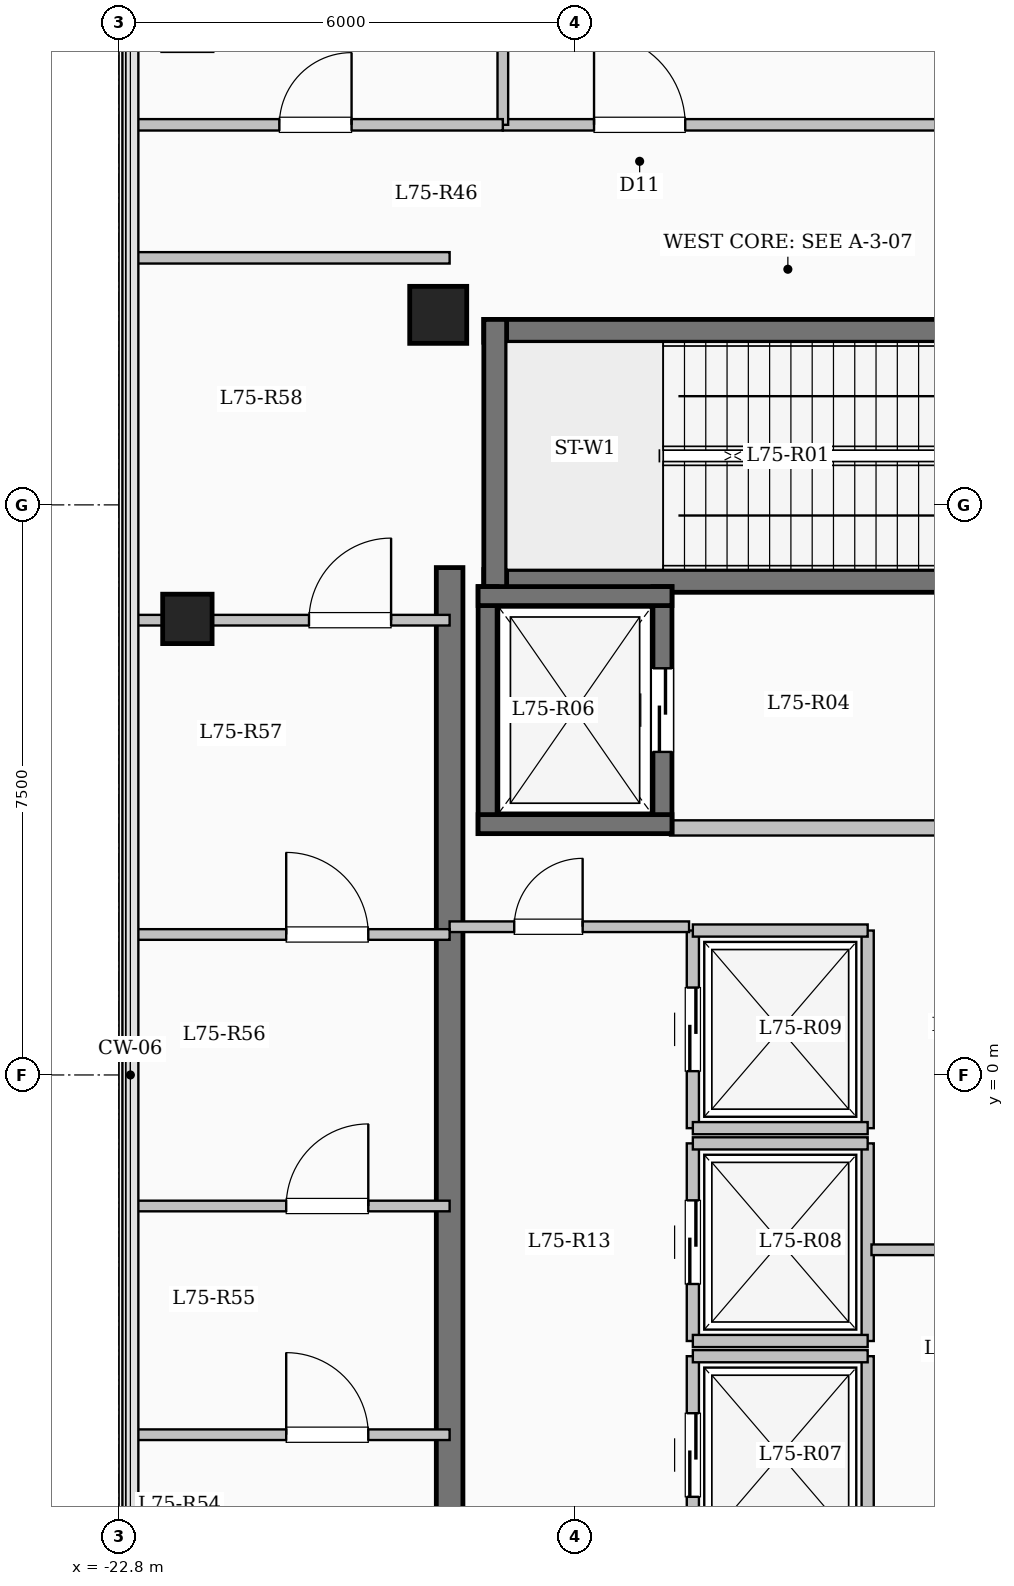
"""IFC4 building model, lengths in metres.
Left out: names, types, materials, properties, quantities, classifications, styles, units other than length and angle.
Written with IfcOpenShell. Run it as: python <this file> out.ifc"""

import sys

from ifc_helpers import new_model, si_unit, direction, frame, frame_2d, origin, origin_2d, place, context, subcontext, project, spatial, rectangle, extrude, element, fill, save


model = new_model("IFC4")
c1 = context("Model", 3, precision=1e-05, world=origin(), true_north=direction((0.0, 1.0)))
c2 = subcontext(c1, "Body", "Model", "MODEL_VIEW")
j1 = project(units=[si_unit("LENGTHUNIT", "METRE"), si_unit("PLANEANGLEUNIT", "RADIAN")], contexts=[c1])
p1 = place(None, origin())
s1 = spatial("IfcSite", under=j1, at=p1, CompositionType="ELEMENT")
p2 = place(p1, origin())
s2 = spatial("IfcBuilding", under=s1, at=p2, CompositionType="ELEMENT")
p3 = place(p2, frame((0.0, 0.0, 276.3)))
s3 = spatial("IfcBuildingStorey", under=s2, at=p3, CompositionType="ELEMENT", Elevation=276.3)
p4 = place(p3, frame((-18.6, 10.0, 0.0), z_axis=(0.0, 0.0, 1.0), x_axis=(1.0, 0.0, 0.0)))
e1 = element("IfcColumn", 1, at=p4, inside=s3, PredefinedType="COLUMN", context=c2, shape_type="SweptSolid", body=[
    extrude(rectangle(XDim=0.75, YDim=0.75, at=origin_2d()), origin(), (0.0, 0.0, 1.0), 5.25),
])
for number, where, z_axis, x_axis in (
    (2, (-21.9, -6.0, 0.0), (0.0, 0.0, 1.0), (1.0, 0.0, 0.0)),
    (3, (-21.9, 6.0, 0.0), (0.0, 0.0, 1.0), (1.0, 0.0, 0.0)),
):
    element("IfcColumn", number, at=place(p3, frame(where, z_axis=z_axis, x_axis=x_axis)), inside=s3, PredefinedType="COLUMN", context=c2, shape_type="SweptSolid", body=[
        extrude(rectangle(XDim=0.65, YDim=0.65, at=origin_2d()), origin(), (0.0, 0.0, 1.0), 5.25),
    ])
p5 = place(p3, frame((-18.0, 9.79, 0.0), z_axis=(0.0, 0.0, 1.0), x_axis=(1.0, 0.0, 0.0)))
e4 = element("IfcWall", 4, at=p5, inside=s3, PredefinedType="SHEAR", context=c2, shape_type="SweptSolid", body=[
    extrude(rectangle(XDim=8.0, YDim=0.3, at=frame_2d((4.0, 0.0))), origin(), (0.0, 0.0, 1.0), 5.25),
])
p6 = place(p3, frame((-18.0, 6.5, 0.0), z_axis=(0.0, 0.0, 1.0), x_axis=(1.0, 0.0, 0.0)))
e5 = element("IfcWall", 5, at=p6, inside=s3, PredefinedType="SHEAR", context=c2, shape_type="SweptSolid", body=[
    extrude(rectangle(XDim=8.0, YDim=0.3, at=frame_2d((4.0, 0.0))), origin(), (0.0, 0.0, 1.0), 5.25),
])
p7 = place(p6, frame((6.45, 0.0, 0.0)))
e6 = element("IfcOpeningElement", 6, at=p7, cuts=e5, PredefinedType="OPENING", context=c2, shape_type="SweptSolid", body=[
    extrude(rectangle(XDim=1.0, YDim=2.15, at=frame_2d((0.5, 1.075))), frame((0.0, 0.16, 0.0), z_axis=(0.0, -1.0, 0.0), x_axis=(1.0, 0.0, 0.0)), (0.0, 0.0, 1.0), 0.32),
])
p8 = place(p3, frame((-17.85, 6.35, 0.0), z_axis=(0.0, 0.0, 1.0), x_axis=(0.0, 1.0, 0.0)))
e7 = element("IfcWall", 7, at=p8, inside=s3, PredefinedType="SHEAR", context=c2, shape_type="SweptSolid", body=[
    extrude(rectangle(XDim=3.59, YDim=0.3, at=frame_2d((1.795, 0.0))), origin(), (0.0, 0.0, 1.0), 5.25),
])
p9 = place(p3, frame((-15.55, 3.25, 0.0), z_axis=(0.0, 0.0, 1.0), x_axis=(1.0, 0.0, 0.0)))
e8 = element("IfcWall", 8, at=p9, inside=s3, PredefinedType="SOLIDWALL", context=c2, shape_type="SweptSolid", body=[
    extrude(rectangle(XDim=5.4, YDim=0.2, at=frame_2d((2.7, 0.0))), origin(), (0.0, 0.0, 1.0), 4.95),
])
p10 = place(p3, frame((-17.95, 3.175, 0.0), z_axis=(0.0, 0.0, 1.0), x_axis=(0.0, 1.0, 0.0)))
e9 = element("IfcWall", 9, at=p10, inside=s3, PredefinedType="SHEAR", context=c2, shape_type="SweptSolid", body=[
    extrude(rectangle(XDim=3.25, YDim=0.25, at=frame_2d((1.625, 0.0))), origin(), (0.0, 0.0, 1.0), 5.25),
])
p11 = place(p3, frame((-15.65, 3.175, 0.0), z_axis=(0.0, 0.0, 1.0), x_axis=(0.0, 1.0, 0.0)))
e10 = element("IfcWall", 10, at=p11, inside=s3, PredefinedType="SHEAR", context=c2, shape_type="SweptSolid", body=[
    extrude(rectangle(XDim=3.25, YDim=0.25, at=frame_2d((1.625, 0.0))), origin(), (0.0, 0.0, 1.0), 5.25),
])
p12 = place(p11, frame((1.075, 0.0, 0.0)))
e11 = element("IfcOpeningElement", 11, at=p12, cuts=e10, PredefinedType="OPENING", context=c2, shape_type="SweptSolid", body=[
    extrude(rectangle(XDim=1.1, YDim=2.15, at=frame_2d((0.55, 1.075))), frame((0.0, 0.135, 0.0), z_axis=(0.0, -1.0, 0.0), x_axis=(1.0, 0.0, 0.0)), (0.0, 0.0, 1.0), 0.27),
])
for number, where, z_axis, x_axis in (
    (12, (-18.075, 3.3, 0.0), (0.0, 0.0, 1.0), (1.0, 0.0, 0.0)),
    (13, (-18.075, 6.3, 0.0), (0.0, 0.0, 1.0), (1.0, 0.0, 0.0)),
):
    element("IfcWall", number, at=place(p3, frame(where, z_axis=z_axis, x_axis=x_axis)), inside=s3, PredefinedType="SHEAR", context=c2, shape_type="SweptSolid", body=[
        extrude(rectangle(XDim=2.55, YDim=0.25, at=frame_2d((1.275, 0.0))), origin(), (0.0, 0.0, 1.0), 5.25),
    ])
p13 = place(p3, frame((-15.25, -6.3, 0.0), z_axis=(0.0, 0.0, 1.0), x_axis=(0.0, 1.0, 0.0)))
e14 = element("IfcWall", 14, at=p13, inside=s3, PredefinedType="SOLIDWALL", context=c2, shape_type="SweptSolid", body=[
    extrude(rectangle(XDim=2.6, YDim=0.16, at=frame_2d((1.3, 0.0))), origin(), (0.0, 0.0, 1.0), 4.95),
])
p14 = place(p13, frame((0.75, 0.0, 0.0)))
e15 = element("IfcOpeningElement", 15, at=p14, cuts=e14, PredefinedType="OPENING", context=c2, shape_type="SweptSolid", body=[
    extrude(rectangle(XDim=1.1, YDim=2.15, at=frame_2d((0.55, 1.075))), frame((0.0, 0.09, 0.0), z_axis=(0.0, -1.0, 0.0), x_axis=(1.0, 0.0, 0.0)), (0.0, 0.0, 1.0), 0.18),
])
p15 = place(p3, frame((-12.95, -6.3, 0.0), z_axis=(0.0, 0.0, 1.0), x_axis=(0.0, 1.0, 0.0)))
e16 = element("IfcWall", 16, at=p15, inside=s3, PredefinedType="SOLIDWALL", context=c2, shape_type="SweptSolid", body=[
    extrude(rectangle(XDim=2.6, YDim=0.16, at=frame_2d((1.3, 0.0))), origin(), (0.0, 0.0, 1.0), 4.95),
])
p16 = place(p3, frame((-15.25, -3.7, 0.0), z_axis=(0.0, 0.0, 1.0), x_axis=(1.0, 0.0, 0.0)))
e17 = element("IfcWall", 17, at=p16, inside=s3, PredefinedType="SOLIDWALL", context=c2, shape_type="SweptSolid", body=[
    extrude(rectangle(XDim=2.3, YDim=0.16, at=frame_2d((1.15, 0.0))), origin(), (0.0, 0.0, 1.0), 4.95),
])
p17 = place(p3, frame((-15.25, -3.5, 0.0), z_axis=(0.0, 0.0, 1.0), x_axis=(0.0, 1.0, 0.0)))
e18 = element("IfcWall", 18, at=p17, inside=s3, PredefinedType="SOLIDWALL", context=c2, shape_type="SweptSolid", body=[
    extrude(rectangle(XDim=2.6, YDim=0.16, at=frame_2d((1.3, 0.0))), origin(), (0.0, 0.0, 1.0), 4.95),
])
p18 = place(p17, frame((0.75, 0.0, 0.0)))
e19 = element("IfcOpeningElement", 19, at=p18, cuts=e18, PredefinedType="OPENING", context=c2, shape_type="SweptSolid", body=[
    extrude(rectangle(XDim=1.1, YDim=2.15, at=frame_2d((0.55, 1.075))), frame((0.0, 0.09, 0.0), z_axis=(0.0, -1.0, 0.0), x_axis=(1.0, 0.0, 0.0)), (0.0, 0.0, 1.0), 0.18),
])
p19 = place(p3, frame((-12.95, -3.5, 0.0), z_axis=(0.0, 0.0, 1.0), x_axis=(0.0, 1.0, 0.0)))
e20 = element("IfcWall", 20, at=p19, inside=s3, PredefinedType="SOLIDWALL", context=c2, shape_type="SweptSolid", body=[
    extrude(rectangle(XDim=2.6, YDim=0.16, at=frame_2d((1.3, 0.0))), origin(), (0.0, 0.0, 1.0), 4.95),
])
for number, where, z_axis, x_axis in (
    (21, (-15.25, -3.5, 0.0), (0.0, 0.0, 1.0), (1.0, 0.0, 0.0)),
    (22, (-15.25, -0.9, 0.0), (0.0, 0.0, 1.0), (1.0, 0.0, 0.0)),
):
    element("IfcWall", number, at=place(p3, frame(where, z_axis=z_axis, x_axis=x_axis)), inside=s3, PredefinedType="SOLIDWALL", context=c2, shape_type="SweptSolid", body=[
        extrude(rectangle(XDim=2.3, YDim=0.16, at=frame_2d((1.15, 0.0))), origin(), (0.0, 0.0, 1.0), 4.95),
    ])
p20 = place(p3, frame((-15.25, -0.7, 0.0), z_axis=(0.0, 0.0, 1.0), x_axis=(0.0, 1.0, 0.0)))
e23 = element("IfcWall", 23, at=p20, inside=s3, PredefinedType="SOLIDWALL", context=c2, shape_type="SweptSolid", body=[
    extrude(rectangle(XDim=2.6, YDim=0.16, at=frame_2d((1.3, 0.0))), origin(), (0.0, 0.0, 1.0), 4.95),
])
p21 = place(p20, frame((0.75, 0.0, 0.0)))
e24 = element("IfcOpeningElement", 24, at=p21, cuts=e23, PredefinedType="OPENING", context=c2, shape_type="SweptSolid", body=[
    extrude(rectangle(XDim=1.1, YDim=2.15, at=frame_2d((0.55, 1.075))), frame((0.0, 0.09, 0.0), z_axis=(0.0, -1.0, 0.0), x_axis=(1.0, 0.0, 0.0)), (0.0, 0.0, 1.0), 0.18),
])
p22 = place(p3, frame((-12.95, -0.7, 0.0), z_axis=(0.0, 0.0, 1.0), x_axis=(0.0, 1.0, 0.0)))
e25 = element("IfcWall", 25, at=p22, inside=s3, PredefinedType="SOLIDWALL", context=c2, shape_type="SweptSolid", body=[
    extrude(rectangle(XDim=2.6, YDim=0.16, at=frame_2d((1.3, 0.0))), origin(), (0.0, 0.0, 1.0), 4.95),
])
for number, where, z_axis, x_axis in (
    (26, (-15.25, -0.7, 0.0), (0.0, 0.0, 1.0), (1.0, 0.0, 0.0)),
    (27, (-15.25, 1.9, 0.0), (0.0, 0.0, 1.0), (1.0, 0.0, 0.0)),
):
    element("IfcWall", number, at=place(p3, frame(where, z_axis=z_axis, x_axis=x_axis)), inside=s3, PredefinedType="SOLIDWALL", context=c2, shape_type="SweptSolid", body=[
        extrude(rectangle(XDim=2.3, YDim=0.16, at=frame_2d((1.15, 0.0))), origin(), (0.0, 0.0, 1.0), 4.95),
    ])
p23 = place(p3, frame((-18.45, -7.375, 0.0), z_axis=(0.0, 0.0, 1.0), x_axis=(0.0, 1.0, 0.0)))
e28 = element("IfcWall", 28, at=p23, inside=s3, PredefinedType="SHEAR", context=c2, shape_type="SweptSolid", body=[
    extrude(rectangle(XDim=14.05, YDim=0.35, at=frame_2d((7.025, 0.0))), origin(), (0.0, 0.0, 1.0), 5.25),
])
p24 = place(p3, frame((-18.45, 1.95, 0.0), z_axis=(0.0, 0.0, 1.0), x_axis=(1.0, 0.0, 0.0)))
e29 = element("IfcWall", 29, at=p24, inside=s3, PredefinedType="PARTITIONING", context=c2, shape_type="SweptSolid", body=[
    extrude(rectangle(XDim=3.15, YDim=0.14, at=frame_2d((1.575, 0.0))), origin(), (0.0, 0.0, 1.0), 4.95),
])
p25 = place(p24, frame((0.85, 0.0, 0.0)))
e30 = element("IfcOpeningElement", 30, at=p25, cuts=e29, PredefinedType="OPENING", context=c2, shape_type="SweptSolid", body=[
    extrude(rectangle(XDim=0.9, YDim=2.08, at=frame_2d((0.45, 1.04))), frame((0.0, 0.08, 0.0), z_axis=(0.0, -1.0, 0.0), x_axis=(1.0, 0.0, 0.0)), (0.0, 0.0, 1.0), 0.16),
])
p26 = place(p3, frame((-12.9, -2.3, 0.0), z_axis=(0.0, 0.0, 1.0), x_axis=(1.0, 0.0, 0.0)))
e31 = element("IfcWall", 31, at=p26, inside=s3, PredefinedType="PARTITIONING", context=c2, shape_type="SweptSolid", body=[
    extrude(rectangle(XDim=2.7, YDim=0.14, at=frame_2d((1.35, 0.0))), origin(), (0.0, 0.0, 1.0), 4.95),
])
p27 = place(p3, frame((-17.75, 12.5, 0.0), z_axis=(0.0, 0.0, 1.0), x_axis=(1.0, 0.0, 0.0)))
e32 = element("IfcWall", 32, at=p27, inside=s3, PredefinedType="PARTITIONING", context=c2, shape_type="SweptSolid", body=[
    extrude(rectangle(XDim=13.9, YDim=0.15, at=frame_2d((6.95, 0.0))), origin(), (0.0, 0.0, 1.0), 4.95),
])
p28 = place(p27, frame((1.2, 0.0, 0.0)))
e33 = element("IfcOpeningElement", 33, at=p28, cuts=e32, PredefinedType="OPENING", context=c2, shape_type="SweptSolid", body=[
    extrude(rectangle(XDim=1.2, YDim=2.15, at=frame_2d((0.6, 1.075))), frame((0.0, 0.085, 0.0), z_axis=(0.0, -1.0, 0.0), x_axis=(1.0, 0.0, 0.0)), (0.0, 0.0, 1.0), 0.17),
])
p29 = place(p27, frame((8.552, 0.0, 0.0)))
e34 = element("IfcOpeningElement", 34, at=p29, cuts=e32, PredefinedType="OPENING", context=c2, shape_type="SweptSolid", body=[
    extrude(rectangle(XDim=1.08, YDim=2.15, at=frame_2d((0.54, 1.075))), frame((0.0, 0.085, 0.0), z_axis=(0.0, -1.0, 0.0), x_axis=(1.0, 0.0, 0.0)), (0.0, 0.0, 1.0), 0.17),
])
p30 = place(p3, frame((-22.68, 10.75, 0.0), z_axis=(0.0, 0.0, 1.0), x_axis=(1.0, 0.0, 0.0)))
e35 = element("IfcWall", 35, at=p30, inside=s3, PredefinedType="PARTITIONING", context=c2, shape_type="SweptSolid", body=[
    extrude(rectangle(XDim=4.23, YDim=0.15, at=frame_2d((2.115, 0.0))), origin(), (0.0, 0.0, 1.0), 4.95),
])
p31 = place(p3, frame((-17.75, 12.5, 0.0), z_axis=(0.0, 0.0, 1.0), x_axis=(0.0, 1.0, 0.0)))
e36 = element("IfcWall", 36, at=p31, inside=s3, PredefinedType="PARTITIONING", context=c2, shape_type="SweptSolid", body=[
    extrude(rectangle(XDim=5.05, YDim=0.14, at=frame_2d((2.525, 0.0))), origin(), (0.0, 0.0, 1.0), 4.95),
])
p32 = place(p3, frame((-22.68, 12.5, 0.0), z_axis=(0.0, 0.0, 1.0), x_axis=(1.0, 0.0, 0.0)))
e37 = element("IfcWall", 37, at=p32, inside=s3, PredefinedType="PARTITIONING", context=c2, shape_type="SweptSolid", body=[
    extrude(rectangle(XDim=4.93, YDim=0.15, at=frame_2d((2.465, 0.0))), origin(), (0.0, 0.0, 1.0), 4.95),
])
p33 = place(p32, frame((1.99, 0.0, 0.0)))
e38 = element("IfcOpeningElement", 38, at=p33, cuts=e37, PredefinedType="OPENING", context=c2, shape_type="SweptSolid", body=[
    extrude(rectangle(XDim=0.95, YDim=2.15, at=frame_2d((0.475, 1.075))), frame((0.0, 0.085, 0.0), z_axis=(0.0, -1.0, 0.0), x_axis=(1.0, 0.0, 0.0)), (0.0, 0.0, 1.0), 0.17),
])
p34 = place(p3, frame((-22.68, -4.733, 0.0), z_axis=(0.0, 0.0, 1.0), x_axis=(1.0, 0.0, 0.0)))
e39 = element("IfcWall", 39, at=p34, inside=s3, PredefinedType="PARTITIONING", context=c2, shape_type="SweptSolid", body=[
    extrude(rectangle(XDim=4.23, YDim=0.14, at=frame_2d((2.115, 0.0))), origin(), (0.0, 0.0, 1.0), 4.95),
])
p35 = place(p34, frame((2.08, 0.0, 0.0)))
e40 = element("IfcOpeningElement", 40, at=p35, cuts=e39, PredefinedType="OPENING", context=c2, shape_type="SweptSolid", body=[
    extrude(rectangle(XDim=1.08, YDim=2.15, at=frame_2d((0.54, 1.075))), frame((0.0, 0.08, 0.0), z_axis=(0.0, -1.0, 0.0), x_axis=(1.0, 0.0, 0.0)), (0.0, 0.0, 1.0), 0.16),
])
p36 = place(p3, frame((-22.68, -1.724, 0.0), z_axis=(0.0, 0.0, 1.0), x_axis=(1.0, 0.0, 0.0)))
e41 = element("IfcWall", 41, at=p36, inside=s3, PredefinedType="PARTITIONING", context=c2, shape_type="SweptSolid", body=[
    extrude(rectangle(XDim=4.23, YDim=0.14, at=frame_2d((2.115, 0.0))), origin(), (0.0, 0.0, 1.0), 4.95),
])
p37 = place(p36, frame((2.08, 0.0, 0.0)))
e42 = element("IfcOpeningElement", 42, at=p37, cuts=e41, PredefinedType="OPENING", context=c2, shape_type="SweptSolid", body=[
    extrude(rectangle(XDim=1.08, YDim=2.15, at=frame_2d((0.54, 1.075))), frame((0.0, 0.08, 0.0), z_axis=(0.0, -1.0, 0.0), x_axis=(1.0, 0.0, 0.0)), (0.0, 0.0, 1.0), 0.16),
])
p38 = place(p3, frame((-22.68, 1.848, 0.0), z_axis=(0.0, 0.0, 1.0), x_axis=(1.0, 0.0, 0.0)))
e43 = element("IfcWall", 43, at=p38, inside=s3, PredefinedType="PARTITIONING", context=c2, shape_type="SweptSolid", body=[
    extrude(rectangle(XDim=4.23, YDim=0.14, at=frame_2d((2.115, 0.0))), origin(), (0.0, 0.0, 1.0), 4.95),
])
p39 = place(p38, frame((2.08, 0.0, 0.0)))
e44 = element("IfcOpeningElement", 44, at=p39, cuts=e43, PredefinedType="OPENING", context=c2, shape_type="SweptSolid", body=[
    extrude(rectangle(XDim=1.08, YDim=2.15, at=frame_2d((0.54, 1.075))), frame((0.0, 0.08, 0.0), z_axis=(0.0, -1.0, 0.0), x_axis=(1.0, 0.0, 0.0)), (0.0, 0.0, 1.0), 0.16),
])
p40 = place(p3, frame((-22.68, 5.983, 0.0), z_axis=(0.0, 0.0, 1.0), x_axis=(1.0, 0.0, 0.0)))
e45 = element("IfcWall", 45, at=p40, inside=s3, PredefinedType="PARTITIONING", context=c2, shape_type="SweptSolid", body=[
    extrude(rectangle(XDim=4.23, YDim=0.14, at=frame_2d((2.115, 0.0))), origin(), (0.0, 0.0, 1.0), 4.535),
])
p41 = place(p40, frame((2.38, 0.0, 0.0)))
e46 = element("IfcOpeningElement", 46, at=p41, cuts=e45, PredefinedType="OPENING", context=c2, shape_type="SweptSolid", body=[
    extrude(rectangle(XDim=1.08, YDim=2.15, at=frame_2d((0.54, 1.075))), frame((0.0, 0.08, 0.0), z_axis=(0.0, -1.0, 0.0), x_axis=(1.0, 0.0, 0.0)), (0.0, 0.0, 1.0), 0.16),
])
p42 = place(p12, origin())
e47 = element("IfcDoor", 47, at=p42, inside=s3, OperationType="SLIDING_TO_LEFT", PredefinedType="DOOR", context=c2, shape_type="SweptSolid", body=[
    extrude(rectangle(XDim=1.1, YDim=2.15, at=frame_2d((0.55, 1.075))), frame((0.0, 0.025, 0.0), z_axis=(0.0, -1.0, 0.0), x_axis=(1.0, 0.0, 0.0)), (0.0, 0.0, 1.0), 0.05),
])
fill(e11, e47)
p43 = place(p14, origin())
e48 = element("IfcDoor", 48, at=p43, inside=s3, OperationType="SLIDING_TO_LEFT", PredefinedType="DOOR", context=c2, shape_type="SweptSolid", body=[
    extrude(rectangle(XDim=1.1, YDim=2.15, at=frame_2d((0.55, 1.075))), frame((0.0, 0.025, 0.0), z_axis=(0.0, -1.0, 0.0), x_axis=(1.0, 0.0, 0.0)), (0.0, 0.0, 1.0), 0.05),
])
fill(e15, e48)
p44 = place(p18, origin())
e49 = element("IfcDoor", 49, at=p44, inside=s3, OperationType="SLIDING_TO_LEFT", PredefinedType="DOOR", context=c2, shape_type="SweptSolid", body=[
    extrude(rectangle(XDim=1.1, YDim=2.15, at=frame_2d((0.55, 1.075))), frame((0.0, 0.025, 0.0), z_axis=(0.0, -1.0, 0.0), x_axis=(1.0, 0.0, 0.0)), (0.0, 0.0, 1.0), 0.05),
])
fill(e19, e49)
p45 = place(p21, origin())
e50 = element("IfcDoor", 50, at=p45, inside=s3, OperationType="SLIDING_TO_LEFT", PredefinedType="DOOR", context=c2, shape_type="SweptSolid", body=[
    extrude(rectangle(XDim=1.1, YDim=2.15, at=frame_2d((0.55, 1.075))), frame((0.0, 0.025, 0.0), z_axis=(0.0, -1.0, 0.0), x_axis=(1.0, 0.0, 0.0)), (0.0, 0.0, 1.0), 0.05),
])
fill(e24, e50)
p46 = place(p25, origin())
e51 = element("IfcDoor", 51, at=p46, inside=s3, OperationType="SINGLE_SWING_RIGHT", PredefinedType="DOOR", context=c2, shape_type="SweptSolid", body=[
    extrude(rectangle(XDim=0.9, YDim=2.08, at=frame_2d((0.45, 1.04))), frame((0.0, 0.025, 0.0), z_axis=(0.0, -1.0, 0.0), x_axis=(1.0, 0.0, 0.0)), (0.0, 0.0, 1.0), 0.05),
])
fill(e30, e51)
p47 = place(p28, origin())
e52 = element("IfcDoor", 52, at=p47, inside=s3, OperationType="SINGLE_SWING_LEFT", PredefinedType="DOOR", context=c2, shape_type="SweptSolid", body=[
    extrude(rectangle(XDim=1.2, YDim=2.15, at=frame_2d((0.6, 1.075))), frame((0.0, 0.025, 0.0), z_axis=(0.0, -1.0, 0.0), x_axis=(1.0, 0.0, 0.0)), (0.0, 0.0, 1.0), 0.05),
])
fill(e33, e52)
p48 = place(p33, origin())
e53 = element("IfcDoor", 53, at=p48, inside=s3, OperationType="SINGLE_SWING_RIGHT", PredefinedType="DOOR", context=c2, shape_type="SweptSolid", body=[
    extrude(rectangle(XDim=0.95, YDim=2.15, at=frame_2d((0.475, 1.075))), frame((0.0, 0.025, 0.0), z_axis=(0.0, -1.0, 0.0), x_axis=(1.0, 0.0, 0.0)), (0.0, 0.0, 1.0), 0.05),
])
fill(e38, e53)
p49 = place(p35, origin())
e54 = element("IfcDoor", 54, at=p49, inside=s3, OperationType="SINGLE_SWING_LEFT", PredefinedType="DOOR", context=c2, shape_type="SweptSolid", body=[
    extrude(rectangle(XDim=1.08, YDim=2.15, at=frame_2d((0.54, 1.075))), frame((0.0, 0.025, 0.0), z_axis=(0.0, -1.0, 0.0), x_axis=(1.0, 0.0, 0.0)), (0.0, 0.0, 1.0), 0.05),
])
fill(e40, e54)
p50 = place(p37, origin())
e55 = element("IfcDoor", 55, at=p50, inside=s3, OperationType="SINGLE_SWING_RIGHT", PredefinedType="DOOR", context=c2, shape_type="SweptSolid", body=[
    extrude(rectangle(XDim=1.08, YDim=2.15, at=frame_2d((0.54, 1.075))), frame((0.0, 0.025, 0.0), z_axis=(0.0, -1.0, 0.0), x_axis=(1.0, 0.0, 0.0)), (0.0, 0.0, 1.0), 0.05),
])
fill(e42, e55)
p51 = place(p39, origin())
e56 = element("IfcDoor", 56, at=p51, inside=s3, OperationType="SINGLE_SWING_LEFT", PredefinedType="DOOR", context=c2, shape_type="SweptSolid", body=[
    extrude(rectangle(XDim=1.08, YDim=2.15, at=frame_2d((0.54, 1.075))), frame((0.0, 0.025, 0.0), z_axis=(0.0, -1.0, 0.0), x_axis=(1.0, 0.0, 0.0)), (0.0, 0.0, 1.0), 0.05),
])
fill(e44, e56)
p52 = place(p41, origin())
e57 = element("IfcDoor", 57, at=p52, inside=s3, OperationType="SINGLE_SWING_RIGHT", PredefinedType="DOOR", context=c2, shape_type="SweptSolid", body=[
    extrude(rectangle(XDim=1.08, YDim=2.15, at=frame_2d((0.54, 1.075))), frame((0.0, 0.025, 0.0), z_axis=(0.0, -1.0, 0.0), x_axis=(1.0, 0.0, 0.0)), (0.0, 0.0, 1.0), 0.05),
])
fill(e46, e57)
save(model, sys.argv[1])
